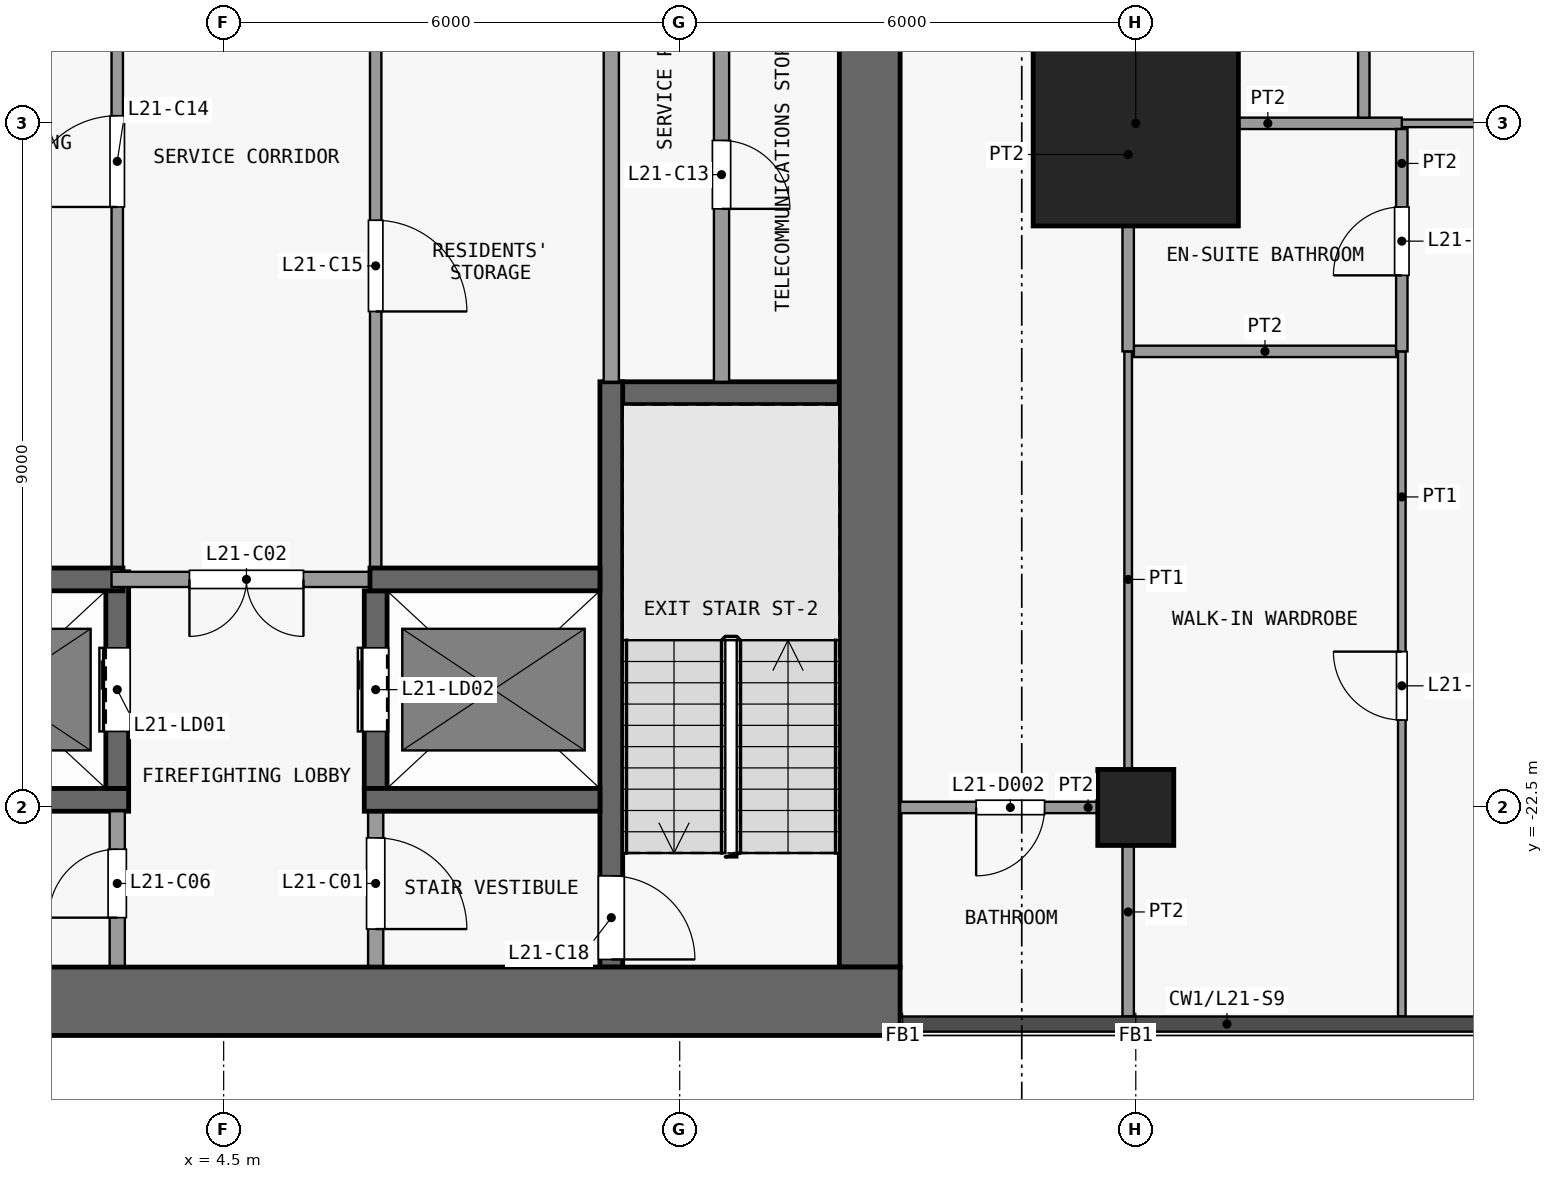
"""IFC4 building model, lengths in metres.
Left out: names, types, materials, properties, quantities, classifications, styles, units other than length and angle.
Written with IfcOpenShell. Run it as: python <this file> out.ifc"""

import sys

from ifc_helpers import new_model, si_unit, direction, frame, frame_2d, origin, origin_2d, place, context, subcontext, project, spatial, rectangle, extrude, element, fill, save


model = new_model("IFC4")
c1 = context("Model", 3, precision=1e-05, world=origin(), true_north=direction((0.0, 1.0)))
c2 = subcontext(c1, "Body", "Model", "MODEL_VIEW")
j1 = project(units=[si_unit("LENGTHUNIT", "METRE"), si_unit("PLANEANGLEUNIT", "RADIAN")], contexts=[c1])
p1 = place(None, origin())
s1 = spatial("IfcSite", under=j1, at=p1, CompositionType="ELEMENT")
p2 = place(p1, origin())
s2 = spatial("IfcBuilding", under=s1, at=p2, CompositionType="ELEMENT")
p3 = place(p2, frame((0.0, 0.0, 88.3)))
s3 = spatial("IfcBuildingStorey", under=s2, at=p3, CompositionType="ELEMENT", Elevation=88.3)
p4 = place(p3, frame((16.5, -22.5, 0.0), z_axis=(0.0, 0.0, 1.0), x_axis=(1.0, 0.0, 0.0)))
e1 = element("IfcColumn", 1, at=p4, inside=s3, PredefinedType="COLUMN", context=c2, shape_type="SweptSolid", body=[
    extrude(rectangle(XDim=1.0, YDim=1.0, at=origin_2d()), origin(), (0.0, 0.0, 1.0), 3.6),
])
p5 = place(p3, frame((16.5, -13.5, 0.0), z_axis=(0.0, 0.0, 1.0), x_axis=(1.0, 0.0, 0.0)))
e2 = element("IfcColumn", 2, at=p5, inside=s3, PredefinedType="COLUMN", context=c2, shape_type="SweptSolid", body=[
    extrude(rectangle(XDim=2.7, YDim=2.7, at=origin_2d()), origin(), (0.0, 0.0, 1.0), 3.6),
])
p6 = place(p3, frame((-13.4, -25.05, 0.0), z_axis=(0.0, 0.0, 1.0), x_axis=(1.0, 0.0, 0.0)))
e3 = element("IfcWall", 3, at=p6, inside=s3, PredefinedType="SHEAR", context=c2, shape_type="SweptSolid", body=[
    extrude(rectangle(XDim=26.8, YDim=0.9, at=frame_2d((13.4, 0.0))), origin(), (0.0, 0.0, 1.0), 3.3),
])
p7 = place(p3, frame((13.0, -24.6, 0.0), z_axis=(0.0, 0.0, 1.0), x_axis=(0.0, 1.0, 0.0)))
e4 = element("IfcWall", 4, at=p7, inside=s3, PredefinedType="SHEAR", context=c2, shape_type="SweptSolid", body=[
    extrude(rectangle(XDim=16.1, YDim=0.8, at=frame_2d((8.05, 0.0))), origin(), (0.0, 0.0, 1.0), 3.3),
])
p8 = place(p3, frame((-2.95, -22.4, 0.0), z_axis=(0.0, 0.0, 1.0), x_axis=(1.0, 0.0, 0.0)))
e5 = element("IfcWall", 5, at=p8, inside=s3, PredefinedType="SHEAR", context=c2, shape_type="SweptSolid", body=[
    extrude(rectangle(XDim=6.2, YDim=0.3, at=frame_2d((3.1, 0.0))), origin(), (0.0, 0.0, 1.0), 3.3),
])
p9 = place(p3, frame((6.35, -22.4, 0.0), z_axis=(0.0, 0.0, 1.0), x_axis=(1.0, 0.0, 0.0)))
e6 = element("IfcWall", 6, at=p9, inside=s3, PredefinedType="SHEAR", context=c2, shape_type="SweptSolid", body=[
    extrude(rectangle(XDim=3.1, YDim=0.3, at=frame_2d((1.55, 0.0))), origin(), (0.0, 0.0, 1.0), 3.3),
])
p10 = place(p3, frame((0.15, -19.5, 0.0), z_axis=(0.0, 0.0, 1.0), x_axis=(1.0, 0.0, 0.0)))
e7 = element("IfcWall", 7, at=p10, inside=s3, PredefinedType="SHEAR", context=c2, shape_type="SweptSolid", body=[
    extrude(rectangle(XDim=3.025, YDim=0.3, at=frame_2d((1.513, 0.0))), origin(), (0.0, 0.0, 1.0), 3.3),
])
p11 = place(p3, frame((6.575, -19.5, 0.0), z_axis=(0.0, 0.0, 1.0), x_axis=(-1.0, 0.0, 0.0)))
e8 = element("IfcWall", 8, at=p11, inside=s3, PredefinedType="PARTITIONING", context=c2, shape_type="SweptSolid", body=[
    extrude(rectangle(XDim=3.55, YDim=0.2, at=frame_2d((1.775, 0.0))), origin(), (0.0, 0.0, 1.0), 3.3),
])
p12 = place(p11, frame((1.025, 0.0, 0.0)))
e9 = element("IfcOpeningElement", 9, at=p12, cuts=e8, PredefinedType="OPENING", context=c2, shape_type="SweptSolid", body=[
    extrude(rectangle(XDim=1.5, YDim=2.1, at=frame_2d((0.75, 1.05))), frame((0.0, 0.11, 0.0), z_axis=(0.0, -1.0, 0.0), x_axis=(1.0, 0.0, 0.0)), (0.0, 0.0, 1.0), 0.22),
])
p13 = place(p3, frame((6.425, -19.5, 0.0), z_axis=(0.0, 0.0, 1.0), x_axis=(1.0, 0.0, 0.0)))
e10 = element("IfcWall", 10, at=p13, inside=s3, PredefinedType="SHEAR", context=c2, shape_type="SweptSolid", body=[
    extrude(rectangle(XDim=3.025, YDim=0.3, at=frame_2d((1.512, 0.0))), origin(), (0.0, 0.0, 1.0), 3.3),
])
p14 = place(p3, frame((9.5, -17.05, 0.0), z_axis=(0.0, 0.0, 1.0), x_axis=(1.0, 0.0, 0.0)))
e11 = element("IfcWall", 11, at=p14, inside=s3, PredefinedType="SHEAR", context=c2, shape_type="SweptSolid", body=[
    extrude(rectangle(XDim=3.1, YDim=0.3, at=frame_2d((1.55, 0.0))), origin(), (0.0, 0.0, 1.0), 3.3),
])
p15 = place(p3, frame((3.1, -24.6, 0.0), z_axis=(0.0, 0.0, 1.0), x_axis=(0.0, 1.0, 0.0)))
e12 = element("IfcWall", 12, at=p15, inside=s3, PredefinedType="PARTITIONING", context=c2, shape_type="SweptSolid", body=[
    extrude(rectangle(XDim=2.05, YDim=0.2, at=frame_2d((1.025, 0.0))), origin(), (0.0, 0.0, 1.0), 3.3),
])
p16 = place(p15, frame((0.65, 0.0, 0.0)))
e13 = element("IfcOpeningElement", 13, at=p16, cuts=e12, PredefinedType="OPENING", context=c2, shape_type="SweptSolid", body=[
    extrude(rectangle(XDim=0.9, YDim=2.1, at=frame_2d((0.45, 1.05))), frame((0.0, 0.11, 0.0), z_axis=(0.0, -1.0, 0.0), x_axis=(1.0, 0.0, 0.0)), (0.0, 0.0, 1.0), 0.22),
])
p17 = place(p3, frame((3.1, -22.25, 0.0), z_axis=(0.0, 0.0, 1.0), x_axis=(0.0, 1.0, 0.0)))
e14 = element("IfcWall", 14, at=p17, inside=s3, PredefinedType="SHEAR", context=c2, shape_type="SweptSolid", body=[
    extrude(rectangle(XDim=2.85, YDim=0.3, at=frame_2d((1.425, 0.0))), origin(), (0.0, 0.0, 1.0), 3.3),
])
p18 = place(p17, frame((0.75, 0.0, 0.0)))
e15 = element("IfcOpeningElement", 15, at=p18, cuts=e14, PredefinedType="OPENING", context=c2, shape_type="SweptSolid", body=[
    extrude(rectangle(XDim=1.1, YDim=2.1, at=frame_2d((0.55, 1.05))), frame((0.0, 0.16, 0.0), z_axis=(0.0, -1.0, 0.0), x_axis=(1.0, 0.0, 0.0)), (0.0, 0.0, 1.0), 0.32),
])
p19 = place(p3, frame((3.1, -19.4, 0.0), z_axis=(0.0, 0.0, 1.0), x_axis=(0.0, 1.0, 0.0)))
e16 = element("IfcWall", 16, at=p19, inside=s3, PredefinedType="PARTITIONING", context=c2, shape_type="SweptSolid", body=[
    extrude(rectangle(XDim=10.9, YDim=0.15, at=frame_2d((5.45, 0.0))), origin(), (0.0, 0.0, 1.0), 3.3),
])
p20 = place(p19, frame((4.8, 0.0, 0.0)))
e17 = element("IfcOpeningElement", 17, at=p20, cuts=e16, PredefinedType="OPENING", context=c2, shape_type="SweptSolid", body=[
    extrude(rectangle(XDim=1.2, YDim=2.1, at=frame_2d((0.6, 1.05))), frame((0.0, 0.085, 0.0), z_axis=(0.0, -1.0, 0.0), x_axis=(1.0, 0.0, 0.0)), (0.0, 0.0, 1.0), 0.17),
])
p21 = place(p3, frame((6.5, -22.55, 0.0), z_axis=(0.0, 0.0, 1.0), x_axis=(0.0, -1.0, 0.0)))
e18 = element("IfcWall", 18, at=p21, inside=s3, PredefinedType="PARTITIONING", context=c2, shape_type="SweptSolid", body=[
    extrude(rectangle(XDim=2.05, YDim=0.2, at=frame_2d((1.025, 0.0))), origin(), (0.0, 0.0, 1.0), 3.3),
])
p22 = place(p21, frame((0.35, 0.0, 0.0)))
e19 = element("IfcOpeningElement", 19, at=p22, cuts=e18, PredefinedType="OPENING", context=c2, shape_type="SweptSolid", body=[
    extrude(rectangle(XDim=1.2, YDim=2.1, at=frame_2d((0.6, 1.05))), frame((0.0, 0.11, 0.0), z_axis=(0.0, -1.0, 0.0), x_axis=(1.0, 0.0, 0.0)), (0.0, 0.0, 1.0), 0.22),
])
p23 = place(p3, frame((6.5, -22.25, 0.0), z_axis=(0.0, 0.0, 1.0), x_axis=(0.0, 1.0, 0.0)))
e20 = element("IfcWall", 20, at=p23, inside=s3, PredefinedType="SHEAR", context=c2, shape_type="SweptSolid", body=[
    extrude(rectangle(XDim=2.6, YDim=0.3, at=frame_2d((1.3, 0.0))), origin(), (0.0, 0.0, 1.0), 3.3),
])
p24 = place(p23, frame((0.75, 0.0, 0.0)))
e21 = element("IfcOpeningElement", 21, at=p24, cuts=e20, PredefinedType="OPENING", context=c2, shape_type="SweptSolid", body=[
    extrude(rectangle(XDim=1.1, YDim=2.1, at=frame_2d((0.55, 1.05))), frame((0.0, 0.16, 0.0), z_axis=(0.0, -1.0, 0.0), x_axis=(1.0, 0.0, 0.0)), (0.0, 0.0, 1.0), 0.32),
])
p25 = place(p3, frame((6.5, -8.5, 0.0), z_axis=(0.0, 0.0, 1.0), x_axis=(0.0, -1.0, 0.0)))
e22 = element("IfcWall", 22, at=p25, inside=s3, PredefinedType="PARTITIONING", context=c2, shape_type="SweptSolid", body=[
    extrude(rectangle(XDim=10.85, YDim=0.15, at=frame_2d((5.425, 0.0))), origin(), (0.0, 0.0, 1.0), 3.3),
])
p26 = place(p25, frame((6.275, 0.0, 0.0)))
e23 = element("IfcOpeningElement", 23, at=p26, cuts=e22, PredefinedType="OPENING", context=c2, shape_type="SweptSolid", body=[
    extrude(rectangle(XDim=1.2, YDim=2.1, at=frame_2d((0.6, 1.05))), frame((0.0, 0.085, 0.0), z_axis=(0.0, -1.0, 0.0), x_axis=(1.0, 0.0, 0.0)), (0.0, 0.0, 1.0), 0.17),
])
p27 = place(p25, frame((0.925, 0.0, 0.0)))
e24 = element("IfcOpeningElement", 24, at=p27, cuts=e22, PredefinedType="OPENING", context=c2, shape_type="SweptSolid", body=[
    extrude(rectangle(XDim=0.9, YDim=2.1, at=frame_2d((0.45, 1.05))), frame((0.0, 0.085, 0.0), z_axis=(0.0, -1.0, 0.0), x_axis=(1.0, 0.0, 0.0)), (0.0, 0.0, 1.0), 0.17),
])
p28 = place(p3, frame((9.6, -16.9, 0.0), z_axis=(0.0, 0.0, 1.0), x_axis=(0.0, -1.0, 0.0)))
e25 = element("IfcWall", 25, at=p28, inside=s3, PredefinedType="SHEAR", context=c2, shape_type="SweptSolid", body=[
    extrude(rectangle(XDim=7.7, YDim=0.3, at=frame_2d((3.85, 0.0))), origin(), (0.0, 0.0, 1.0), 3.3),
])
p29 = place(p28, frame((6.5, 0.0, 0.0)))
e26 = element("IfcOpeningElement", 26, at=p29, cuts=e25, PredefinedType="OPENING", context=c2, shape_type="SweptSolid", body=[
    extrude(rectangle(XDim=1.1, YDim=2.1, at=frame_2d((0.55, 1.05))), frame((0.0, 0.16, 0.0), z_axis=(0.0, -1.0, 0.0), x_axis=(1.0, 0.0, 0.0)), (0.0, 0.0, 1.0), 0.32),
])
p30 = place(p3, frame((9.6, -16.9, 0.0), z_axis=(0.0, 0.0, 1.0), x_axis=(0.0, 1.0, 0.0)))
e27 = element("IfcWall", 27, at=p30, inside=s3, PredefinedType="PARTITIONING", context=c2, shape_type="SweptSolid", body=[
    extrude(rectangle(XDim=8.4, YDim=0.2, at=frame_2d((4.2, 0.0))), origin(), (0.0, 0.0, 1.0), 3.3),
])
p31 = place(p3, frame((11.05, -11.2, 0.0), z_axis=(0.0, 0.0, 1.0), x_axis=(0.0, -1.0, 0.0)))
e28 = element("IfcWall", 28, at=p31, inside=s3, PredefinedType="PARTITIONING", context=c2, shape_type="SweptSolid", body=[
    extrude(rectangle(XDim=5.7, YDim=0.2, at=frame_2d((2.85, 0.0))), origin(), (0.0, 0.0, 1.0), 3.3),
])
p32 = place(p31, frame((2.525, 0.0, 0.0)))
e29 = element("IfcOpeningElement", 29, at=p32, cuts=e28, PredefinedType="OPENING", context=c2, shape_type="SweptSolid", body=[
    extrude(rectangle(XDim=0.9, YDim=2.1, at=frame_2d((0.45, 1.05))), frame((0.0, 0.11, 0.0), z_axis=(0.0, -1.0, 0.0), x_axis=(1.0, 0.0, 0.0)), (0.0, 0.0, 1.0), 0.22),
])
p33 = place(p3, frame((13.4, -22.5, 0.0), z_axis=(0.0, 0.0, 1.0), x_axis=(1.0, 0.0, 0.0)))
e30 = element("IfcWall", 30, at=p33, inside=s3, PredefinedType="PARTITIONING", context=c2, shape_type="SweptSolid", body=[
    extrude(rectangle(XDim=2.925, YDim=0.15, at=frame_2d((1.462, 0.0))), origin(), (0.0, 0.0, 1.0), 3.3),
])
p34 = place(p33, frame((1.0, 0.0, 0.0)))
e31 = element("IfcOpeningElement", 31, at=p34, cuts=e30, PredefinedType="OPENING", context=c2, shape_type="SweptSolid", body=[
    extrude(rectangle(XDim=0.9, YDim=2.1, at=frame_2d((0.45, 1.05))), frame((0.0, 0.085, 0.0), z_axis=(0.0, -1.0, 0.0), x_axis=(1.0, 0.0, 0.0)), (0.0, 0.0, 1.0), 0.17),
])
p35 = place(p3, frame((16.475, -16.5, 0.0), z_axis=(0.0, 0.0, 1.0), x_axis=(1.0, 0.0, 0.0)))
e32 = element("IfcWall", 32, at=p35, inside=s3, PredefinedType="PARTITIONING", context=c2, shape_type="SweptSolid", body=[
    extrude(rectangle(XDim=3.45, YDim=0.15, at=frame_2d((1.725, 0.0))), origin(), (0.0, 0.0, 1.0), 3.3),
])
p36 = place(p3, frame((20.0, -13.5, 0.0), z_axis=(0.0, 0.0, 1.0), x_axis=(1.0, 0.0, 0.0)))
e33 = element("IfcWall", 33, at=p36, inside=s3, PredefinedType="PARTITIONING", context=c2, shape_type="SweptSolid", body=[
    extrude(rectangle(XDim=5.25, YDim=0.1, at=frame_2d((2.625, 0.0))), origin(), (0.0, 0.0, 1.0), 3.3),
])
p37 = place(p36, frame((3.1, 0.0, 0.0)))
e34 = element("IfcOpeningElement", 34, at=p37, cuts=e33, PredefinedType="OPENING", context=c2, shape_type="SweptSolid", body=[
    extrude(rectangle(XDim=0.9, YDim=2.1, at=frame_2d((0.45, 1.05))), frame((0.0, 0.06, 0.0), z_axis=(0.0, -1.0, 0.0), x_axis=(1.0, 0.0, 0.0)), (0.0, 0.0, 1.0), 0.12),
])
p38 = place(p3, frame((16.475, -13.5, 0.0), z_axis=(0.0, 0.0, 1.0), x_axis=(1.0, 0.0, 0.0)))
e35 = element("IfcWall", 35, at=p38, inside=s3, PredefinedType="PARTITIONING", context=c2, shape_type="SweptSolid", body=[
    extrude(rectangle(XDim=3.525, YDim=0.15, at=frame_2d((1.762, 0.0))), origin(), (0.0, 0.0, 1.0), 3.3),
])
p39 = place(p3, frame((16.4, -22.5, 0.0), z_axis=(0.0, 0.0, 1.0), x_axis=(0.0, 1.0, 0.0)))
e36 = element("IfcWall", 36, at=p39, inside=s3, PredefinedType="PARTITIONING", context=c2, shape_type="SweptSolid", body=[
    extrude(rectangle(XDim=6.0, YDim=0.1, at=frame_2d((3.0, 0.0))), origin(), (0.0, 0.0, 1.0), 3.3),
])
p40 = place(p3, frame((16.4, -25.25, 0.0), z_axis=(0.0, 0.0, 1.0), x_axis=(0.0, 1.0, 0.0)))
e37 = element("IfcWall", 37, at=p40, inside=s3, PredefinedType="PARTITIONING", context=c2, shape_type="SweptSolid", body=[
    extrude(rectangle(XDim=2.75, YDim=0.15, at=frame_2d((1.375, 0.0))), origin(), (0.0, 0.0, 1.0), 3.3),
])
p41 = place(p3, frame((16.4, -16.5, 0.0), z_axis=(0.0, 0.0, 1.0), x_axis=(0.0, 1.0, 0.0)))
e38 = element("IfcWall", 38, at=p41, inside=s3, PredefinedType="PARTITIONING", context=c2, shape_type="SweptSolid", body=[
    extrude(rectangle(XDim=8.5, YDim=0.15, at=frame_2d((4.25, 0.0))), origin(), (0.0, 0.0, 1.0), 3.3),
])
p42 = place(p41, frame((5.3, 0.0, 0.0)))
e39 = element("IfcOpeningElement", 39, at=p42, cuts=e38, PredefinedType="OPENING", context=c2, shape_type="SweptSolid", body=[
    extrude(rectangle(XDim=0.9, YDim=2.1, at=frame_2d((0.45, 1.05))), frame((0.0, 0.085, 0.0), z_axis=(0.0, -1.0, 0.0), x_axis=(1.0, 0.0, 0.0)), (0.0, 0.0, 1.0), 0.17),
])
p43 = place(p3, frame((19.5, -13.425, 0.0), z_axis=(0.0, 0.0, 1.0), x_axis=(0.0, 1.0, 0.0)))
e40 = element("IfcWall", 40, at=p43, inside=s3, PredefinedType="PARTITIONING", context=c2, shape_type="SweptSolid", body=[
    extrude(rectangle(XDim=5.425, YDim=0.15, at=frame_2d((2.712, 0.0))), origin(), (0.0, 0.0, 1.0), 3.3),
])
p44 = place(p43, frame((2.3, 0.0, 0.0)))
e41 = element("IfcOpeningElement", 41, at=p44, cuts=e40, PredefinedType="OPENING", context=c2, shape_type="SweptSolid", body=[
    extrude(rectangle(XDim=0.9, YDim=2.1, at=frame_2d((0.45, 1.05))), frame((0.0, 0.085, 0.0), z_axis=(0.0, -1.0, 0.0), x_axis=(1.0, 0.0, 0.0)), (0.0, 0.0, 1.0), 0.17),
])
p45 = place(p3, frame((20.0, -25.25, 0.0), z_axis=(0.0, 0.0, 1.0), x_axis=(0.0, 1.0, 0.0)))
e42 = element("IfcWall", 42, at=p45, inside=s3, PredefinedType="PARTITIONING", context=c2, shape_type="SweptSolid", body=[
    extrude(rectangle(XDim=8.75, YDim=0.1, at=frame_2d((4.375, 0.0))), origin(), (0.0, 0.0, 1.0), 3.3),
])
p46 = place(p45, frame((3.9, 0.0, 0.0)))
e43 = element("IfcOpeningElement", 43, at=p46, cuts=e42, PredefinedType="OPENING", context=c2, shape_type="SweptSolid", body=[
    extrude(rectangle(XDim=0.9, YDim=2.1, at=frame_2d((0.45, 1.05))), frame((0.0, 0.06, 0.0), z_axis=(0.0, -1.0, 0.0), x_axis=(1.0, 0.0, 0.0)), (0.0, 0.0, 1.0), 0.12),
])
p47 = place(p3, frame((20.0, -16.5, 0.0), z_axis=(0.0, 0.0, 1.0), x_axis=(0.0, 1.0, 0.0)))
e44 = element("IfcWall", 44, at=p47, inside=s3, PredefinedType="PARTITIONING", context=c2, shape_type="SweptSolid", body=[
    extrude(rectangle(XDim=2.925, YDim=0.15, at=frame_2d((1.462, 0.0))), origin(), (0.0, 0.0, 1.0), 3.3),
])
p48 = place(p47, frame((1.0, 0.0, 0.0)))
e45 = element("IfcOpeningElement", 45, at=p48, cuts=e44, PredefinedType="OPENING", context=c2, shape_type="SweptSolid", body=[
    extrude(rectangle(XDim=0.9, YDim=2.1, at=frame_2d((0.45, 1.05))), frame((0.0, 0.085, 0.0), z_axis=(0.0, -1.0, 0.0), x_axis=(1.0, 0.0, 0.0)), (0.0, 0.0, 1.0), 0.17),
])
p49 = place(p18, origin())
e46 = element("IfcDoor", 46, at=p49, inside=s3, OperationType="DOUBLE_DOOR_SLIDING", PredefinedType="DOOR", context=c2, shape_type="SweptSolid", body=[
    extrude(rectangle(XDim=1.1, YDim=2.1, at=frame_2d((0.55, 1.05))), frame((0.0, 0.025, 0.0), z_axis=(0.0, -1.0, 0.0), x_axis=(1.0, 0.0, 0.0)), (0.0, 0.0, 1.0), 0.05),
])
fill(e15, e46)
p50 = place(p24, origin())
e47 = element("IfcDoor", 47, at=p50, inside=s3, OperationType="DOUBLE_DOOR_SLIDING", PredefinedType="DOOR", context=c2, shape_type="SweptSolid", body=[
    extrude(rectangle(XDim=1.1, YDim=2.1, at=frame_2d((0.55, 1.05))), frame((0.0, 0.025, 0.0), z_axis=(0.0, -1.0, 0.0), x_axis=(1.0, 0.0, 0.0)), (0.0, 0.0, 1.0), 0.05),
])
fill(e21, e47)
p51 = place(p22, origin())
e48 = element("IfcDoor", 48, at=p51, inside=s3, OperationType="SINGLE_SWING_RIGHT", PredefinedType="DOOR", context=c2, shape_type="SweptSolid", body=[
    extrude(rectangle(XDim=1.2, YDim=2.1, at=frame_2d((0.6, 1.05))), frame((0.0, 0.025, 0.0), z_axis=(0.0, -1.0, 0.0), x_axis=(1.0, 0.0, 0.0)), (0.0, 0.0, 1.0), 0.05),
])
fill(e19, e48)
p52 = place(p12, origin())
e49 = element("IfcDoor", 49, at=p52, inside=s3, OperationType="DOUBLE_DOOR_SINGLE_SWING", PredefinedType="DOOR", context=c2, shape_type="SweptSolid", body=[
    extrude(rectangle(XDim=1.5, YDim=2.1, at=frame_2d((0.75, 1.05))), frame((0.0, 0.025, 0.0), z_axis=(0.0, -1.0, 0.0), x_axis=(1.0, 0.0, 0.0)), (0.0, 0.0, 1.0), 0.05),
])
fill(e9, e49)
p53 = place(p16, origin())
e50 = element("IfcDoor", 50, at=p53, inside=s3, OperationType="SINGLE_SWING_LEFT", PredefinedType="DOOR", context=c2, shape_type="SweptSolid", body=[
    extrude(rectangle(XDim=0.9, YDim=2.1, at=frame_2d((0.45, 1.05))), frame((0.0, 0.025, 0.0), z_axis=(0.0, -1.0, 0.0), x_axis=(1.0, 0.0, 0.0)), (0.0, 0.0, 1.0), 0.05),
])
fill(e13, e50)
p54 = place(p32, origin())
e51 = element("IfcDoor", 51, at=p54, inside=s3, OperationType="SINGLE_SWING_RIGHT", PredefinedType="DOOR", context=c2, shape_type="SweptSolid", body=[
    extrude(rectangle(XDim=0.9, YDim=2.1, at=frame_2d((0.45, 1.05))), frame((0.0, 0.025, 0.0), z_axis=(0.0, -1.0, 0.0), x_axis=(1.0, 0.0, 0.0)), (0.0, 0.0, 1.0), 0.05),
])
fill(e29, e51)
p55 = place(p20, origin())
e52 = element("IfcDoor", 52, at=p55, inside=s3, OperationType="SINGLE_SWING_LEFT", PredefinedType="DOOR", context=c2, shape_type="SweptSolid", body=[
    extrude(rectangle(XDim=1.2, YDim=2.1, at=frame_2d((0.6, 1.05))), frame((0.0, 0.025, 0.0), z_axis=(0.0, -1.0, 0.0), x_axis=(1.0, 0.0, 0.0)), (0.0, 0.0, 1.0), 0.05),
])
fill(e17, e52)
p56 = place(p26, origin())
e53 = element("IfcDoor", 53, at=p56, inside=s3, OperationType="SINGLE_SWING_RIGHT", PredefinedType="DOOR", context=c2, shape_type="SweptSolid", body=[
    extrude(rectangle(XDim=1.2, YDim=2.1, at=frame_2d((0.6, 1.05))), frame((0.0, 0.025, 0.0), z_axis=(0.0, -1.0, 0.0), x_axis=(1.0, 0.0, 0.0)), (0.0, 0.0, 1.0), 0.05),
])
fill(e23, e53)
p57 = place(p29, origin())
e54 = element("IfcDoor", 54, at=p57, inside=s3, OperationType="SINGLE_SWING_RIGHT", PredefinedType="DOOR", context=c2, shape_type="SweptSolid", body=[
    extrude(rectangle(XDim=1.1, YDim=2.1, at=frame_2d((0.55, 1.05))), frame((0.0, 0.025, 0.0), z_axis=(0.0, -1.0, 0.0), x_axis=(1.0, 0.0, 0.0)), (0.0, 0.0, 1.0), 0.05),
])
fill(e26, e54)
p58 = place(p34, origin())
e55 = element("IfcDoor", 55, at=p58, inside=s3, OperationType="SINGLE_SWING_LEFT", PredefinedType="DOOR", context=c2, shape_type="SweptSolid", body=[
    extrude(rectangle(XDim=0.9, YDim=2.1, at=frame_2d((0.45, 1.05))), frame((0.0, 0.025, 0.0), z_axis=(0.0, -1.0, 0.0), x_axis=(1.0, 0.0, 0.0)), (0.0, 0.0, 1.0), 0.05),
])
fill(e31, e55)
p59 = place(p46, origin())
e56 = element("IfcDoor", 56, at=p59, inside=s3, OperationType="SINGLE_SWING_LEFT", PredefinedType="DOOR", context=c2, shape_type="SweptSolid", body=[
    extrude(rectangle(XDim=0.9, YDim=2.1, at=frame_2d((0.45, 1.05))), frame((0.0, 0.025, 0.0), z_axis=(0.0, -1.0, 0.0), x_axis=(1.0, 0.0, 0.0)), (0.0, 0.0, 1.0), 0.05),
])
fill(e43, e56)
p60 = place(p48, origin())
e57 = element("IfcDoor", 57, at=p60, inside=s3, OperationType="SINGLE_SWING_RIGHT", PredefinedType="DOOR", context=c2, shape_type="SweptSolid", body=[
    extrude(rectangle(XDim=0.9, YDim=2.1, at=frame_2d((0.45, 1.05))), frame((0.0, 0.025, 0.0), z_axis=(0.0, -1.0, 0.0), x_axis=(1.0, 0.0, 0.0)), (0.0, 0.0, 1.0), 0.05),
])
fill(e45, e57)
save(model, sys.argv[1])
